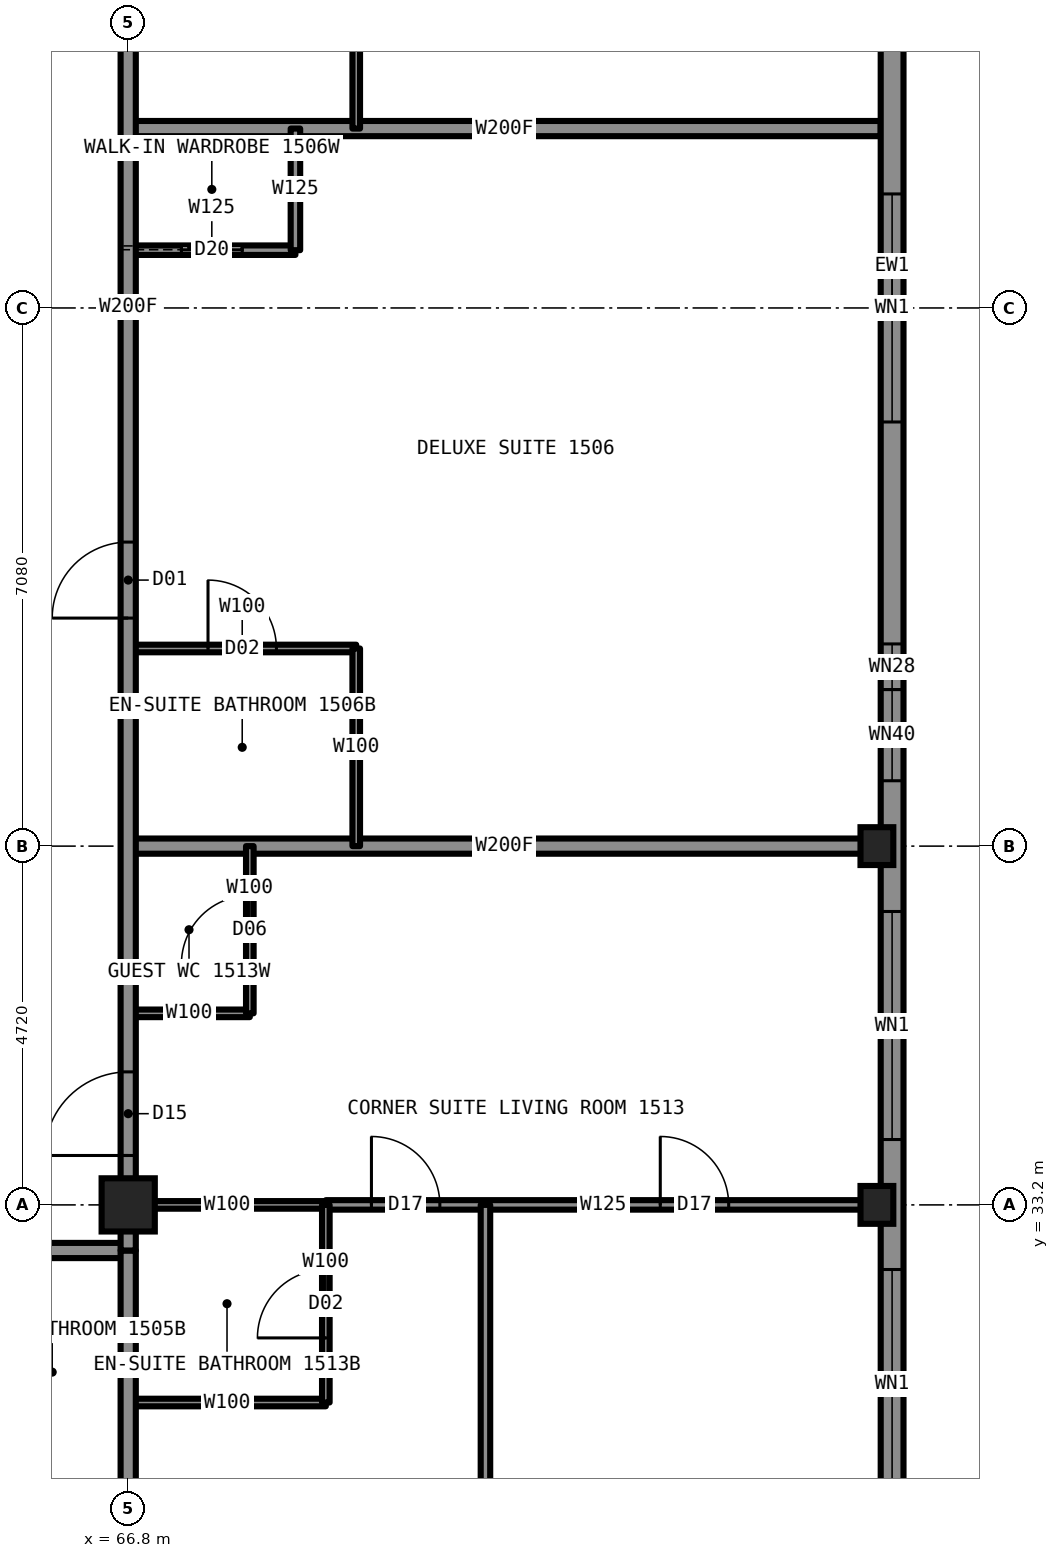
"""IFC4 building model, lengths in metres.
Left out: names, types, materials, properties, quantities, classifications, styles, units other than length and angle.
Written with IfcOpenShell. Run it as: python <this file> out.ifc"""

import sys

from ifc_helpers import new_model, si_unit, direction, frame, frame_2d, origin, origin_2d, place, context, subcontext, project, spatial, rectangle, hollow_rectangle, i_section, extrude, element, fill, save


model = new_model("IFC4")
c1 = context("Model", 3, precision=1e-05, world=origin(), true_north=direction((0.0, 1.0)))
c2 = subcontext(c1, "Body", "Model", "MODEL_VIEW")
j1 = project(units=[si_unit("LENGTHUNIT", "METRE"), si_unit("PLANEANGLEUNIT", "RADIAN")], contexts=[c1])
p1 = place(None, origin())
s1 = spatial("IfcSite", under=j1, at=p1, CompositionType="ELEMENT")
p2 = place(p1, origin())
s2 = spatial("IfcBuilding", under=s1, at=p2, CompositionType="ELEMENT")
p3 = place(p2, frame((0.0, 0.0, 60.0)))
s3 = spatial("IfcBuildingStorey", under=s2, at=p3, CompositionType="ELEMENT", Elevation=60.0)
for number, where, z_axis, x_axis in (
    (1, (76.65, 33.2, 0.0), (0.0, 0.0, 1.0), (1.0, 0.0, 0.0)),
    (2, (76.65, 37.92, 0.0), (0.0, 0.0, 1.0), (1.0, 0.0, 0.0)),
):
    element("IfcColumn", number, at=place(p3, frame(where, z_axis=z_axis, x_axis=x_axis)), inside=s3, PredefinedType="COLUMN", context=c2, shape_type="SweptSolid", body=[
        extrude(i_section(OverallWidth=0.432, OverallDepth=0.498, WebThickness=0.056, FlangeThickness=0.089, at=origin_2d()), origin(), (0.0, 0.0, 1.0), 3.5),
    ])
p4 = place(p3, frame((66.8, 33.2, 0.0), z_axis=(0.0, 0.0, 1.0), x_axis=(1.0, 0.0, 0.0)))
e3 = element("IfcColumn", 3, at=p4, inside=s3, PredefinedType="COLUMN", context=c2, shape_type="SweptSolid", body=[
    extrude(hollow_rectangle(XDim=0.7, YDim=0.7, WallThickness=0.06, at=origin_2d()), origin(), (0.0, 0.0, 1.0), 3.5),
])
p5 = place(p3, frame((66.8, 33.2, 0.0), z_axis=(0.0, 0.0, 1.0), x_axis=(1.0, 0.0, 0.0)))
e4 = element("IfcWall", 4, at=p5, inside=s3, PredefinedType="PARTITIONING", context=c2, shape_type="SweptSolid", body=[
    extrude(rectangle(XDim=2.6, YDim=0.1, at=frame_2d((1.3, 0.0))), origin(), (0.0, 0.0, 1.0), 2.573),
])
p6 = place(p3, frame((69.4, 33.2, 0.0), z_axis=(0.0, 0.0, 1.0), x_axis=(1.0, 0.0, 0.0)))
e5 = element("IfcWall", 5, at=p6, inside=s3, PredefinedType="PARTITIONING", context=c2, shape_type="SweptSolid", body=[
    extrude(rectangle(XDim=7.3, YDim=0.125, at=frame_2d((3.65, 0.0))), origin(), (0.0, 0.0, 1.0), 2.573),
])
p7 = place(p6, frame((0.6, 0.0, 0.0)))
e6 = element("IfcOpeningElement", 6, at=p7, cuts=e5, PredefinedType="OPENING", context=c2, shape_type="SweptSolid", body=[
    extrude(rectangle(XDim=0.9, YDim=2.2, at=frame_2d((0.45, 1.1))), frame((0.0, 0.073, 0.0), z_axis=(0.0, -1.0, 0.0), x_axis=(1.0, 0.0, 0.0)), (0.0, 0.0, 1.0), 0.145),
])
p8 = place(p6, frame((4.4, 0.0, 0.0)))
e7 = element("IfcOpeningElement", 7, at=p8, cuts=e5, PredefinedType="OPENING", context=c2, shape_type="SweptSolid", body=[
    extrude(rectangle(XDim=0.9, YDim=2.2, at=frame_2d((0.45, 1.1))), frame((0.0, 0.073, 0.0), z_axis=(0.0, -1.0, 0.0), x_axis=(1.0, 0.0, 0.0)), (0.0, 0.0, 1.0), 0.145),
])
p9 = place(p3, frame((43.2, 32.6, 0.0), z_axis=(0.0, 0.0, 1.0), x_axis=(1.0, 0.0, 0.0)))
e8 = element("IfcWall", 8, at=p9, inside=s3, PredefinedType="PARTITIONING", context=c2, shape_type="SweptSolid", body=[
    extrude(rectangle(XDim=23.6, YDim=0.2, at=frame_2d((11.8, 0.0))), origin(), (0.0, 0.0, 1.0), 3.33),
])
p10 = place(p9, frame((3.0, 0.0, 0.0)))
e9 = element("IfcOpeningElement", 9, at=p10, cuts=e8, PredefinedType="OPENING", context=c2, shape_type="SweptSolid", body=[
    extrude(rectangle(XDim=1.0, YDim=2.2, at=frame_2d((0.5, 1.1))), frame((0.0, 0.11, 0.0), z_axis=(0.0, -1.0, 0.0), x_axis=(1.0, 0.0, 0.0)), (0.0, 0.0, 1.0), 0.22),
])
p11 = place(p9, frame((12.44, 0.0, 0.0)))
e10 = element("IfcOpeningElement", 10, at=p11, cuts=e8, PredefinedType="OPENING", context=c2, shape_type="SweptSolid", body=[
    extrude(rectangle(XDim=1.0, YDim=2.2, at=frame_2d((0.5, 1.1))), frame((0.0, 0.11, 0.0), z_axis=(0.0, -1.0, 0.0), x_axis=(1.0, 0.0, 0.0)), (0.0, 0.0, 1.0), 0.22),
])
p12 = place(p9, frame((20.34, 0.0, 0.0)))
e11 = element("IfcOpeningElement", 11, at=p12, cuts=e8, PredefinedType="OPENING", context=c2, shape_type="SweptSolid", body=[
    extrude(rectangle(XDim=1.0, YDim=2.2, at=frame_2d((0.5, 1.1))), frame((0.0, 0.11, 0.0), z_axis=(0.0, -1.0, 0.0), x_axis=(1.0, 0.0, 0.0)), (0.0, 0.0, 1.0), 0.22),
])
p13 = place(p3, frame((66.8, 30.6, 0.0), z_axis=(0.0, 0.0, 1.0), x_axis=(1.0, 0.0, 0.0)))
e12 = element("IfcWall", 12, at=p13, inside=s3, PredefinedType="PARTITIONING", context=c2, shape_type="SweptSolid", body=[
    extrude(rectangle(XDim=2.6, YDim=0.1, at=frame_2d((1.3, 0.0))), origin(), (0.0, 0.0, 1.0), 3.33),
])
p14 = place(p3, frame((66.8, 40.52, 0.0), z_axis=(0.0, 0.0, 1.0), x_axis=(1.0, 0.0, 0.0)))
e13 = element("IfcWall", 13, at=p14, inside=s3, PredefinedType="PARTITIONING", context=c2, shape_type="SweptSolid", body=[
    extrude(rectangle(XDim=3.0, YDim=0.1, at=frame_2d((1.5, 0.0))), origin(), (0.0, 0.0, 1.0), 3.33),
])
p15 = place(p14, frame((1.05, 0.0, 0.0)))
e14 = element("IfcOpeningElement", 14, at=p15, cuts=e13, PredefinedType="OPENING", context=c2, shape_type="SweptSolid", body=[
    extrude(rectangle(XDim=0.9, YDim=2.1, at=frame_2d((0.45, 1.05))), frame((0.0, 0.06, 0.0), z_axis=(0.0, -1.0, 0.0), x_axis=(1.0, 0.0, 0.0)), (0.0, 0.0, 1.0), 0.12),
])
p16 = place(p3, frame((66.8, 37.92, 0.0), z_axis=(0.0, 0.0, 1.0), x_axis=(1.0, 0.0, 0.0)))
e15 = element("IfcWall", 15, at=p16, inside=s3, PredefinedType="PARTITIONING", context=c2, shape_type="SweptSolid", body=[
    extrude(rectangle(XDim=9.9, YDim=0.2, at=frame_2d((4.95, 0.0))), origin(), (0.0, 0.0, 1.0), 2.573),
])
p17 = place(p3, frame((66.8, 35.72, 0.0), z_axis=(0.0, 0.0, 1.0), x_axis=(1.0, 0.0, 0.0)))
e16 = element("IfcWall", 16, at=p17, inside=s3, PredefinedType="PARTITIONING", context=c2, shape_type="SweptSolid", body=[
    extrude(rectangle(XDim=1.6, YDim=0.1, at=frame_2d((0.8, 0.0))), origin(), (0.0, 0.0, 1.0), 2.723),
])
p18 = place(p3, frame((66.8, 45.76, 0.0), z_axis=(0.0, 0.0, 1.0), x_axis=(1.0, 0.0, 0.0)))
e17 = element("IfcWall", 17, at=p18, inside=s3, PredefinedType="PARTITIONING", context=c2, shape_type="SweptSolid", body=[
    extrude(rectangle(XDim=2.2, YDim=0.125, at=frame_2d((1.1, 0.0))), origin(), (0.0, 0.0, 1.0), 3.33),
])
p19 = place(p18, frame((0.7, 0.0, 0.0)))
e18 = element("IfcOpeningElement", 18, at=p19, cuts=e17, PredefinedType="OPENING", context=c2, shape_type="SweptSolid", body=[
    extrude(rectangle(XDim=0.8, YDim=2.1, at=frame_2d((0.4, 1.05))), frame((0.0, 0.073, 0.0), z_axis=(0.0, -1.0, 0.0), x_axis=(1.0, 0.0, 0.0)), (0.0, 0.0, 1.0), 0.145),
])
p20 = place(p3, frame((66.8, 47.36, 0.0), z_axis=(0.0, 0.0, 1.0), x_axis=(1.0, 0.0, 0.0)))
e19 = element("IfcWall", 19, at=p20, inside=s3, PredefinedType="PARTITIONING", context=c2, shape_type="SweptSolid", body=[
    extrude(rectangle(XDim=9.9, YDim=0.2, at=frame_2d((4.95, 0.0))), origin(), (0.0, 0.0, 1.0), 2.723),
])
p21 = place(p3, frame((66.8, 33.22, 0.0), z_axis=(0.0, 0.0, 1.0), x_axis=(0.0, 1.0, 0.0)))
e20 = element("IfcWall", 20, at=p21, inside=s3, PredefinedType="PARTITIONING", context=c2, shape_type="SweptSolid", body=[
    extrude(rectangle(XDim=23.58, YDim=0.2, at=frame_2d((11.79, 0.0))), origin(), (0.0, 0.0, 1.0), 3.33),
])
p22 = place(p21, frame((7.7, 0.0, 0.0)))
e21 = element("IfcOpeningElement", 21, at=p22, cuts=e20, PredefinedType="OPENING", context=c2, shape_type="SweptSolid", body=[
    extrude(rectangle(XDim=1.0, YDim=2.2, at=frame_2d((0.5, 1.1))), frame((0.0, 0.11, 0.0), z_axis=(0.0, -1.0, 0.0), x_axis=(1.0, 0.0, 0.0)), (0.0, 0.0, 1.0), 0.22),
])
p23 = place(p21, frame((17.29, 0.0, 0.0)))
e22 = element("IfcOpeningElement", 22, at=p23, cuts=e20, PredefinedType="OPENING", context=c2, shape_type="SweptSolid", body=[
    extrude(rectangle(XDim=1.0, YDim=2.2, at=frame_2d((0.5, 1.1))), frame((0.0, 0.11, 0.0), z_axis=(0.0, -1.0, 0.0), x_axis=(1.0, 0.0, 0.0)), (0.0, 0.0, 1.0), 0.22),
])
p24 = place(p21, frame((21.83, 0.0, 0.0)))
e23 = element("IfcOpeningElement", 23, at=p24, cuts=e20, PredefinedType="OPENING", context=c2, shape_type="SweptSolid", body=[
    extrude(rectangle(XDim=1.1, YDim=2.2, at=frame_2d((0.55, 1.1))), frame((0.0, 0.11, 0.0), z_axis=(0.0, -1.0, 0.0), x_axis=(1.0, 0.0, 0.0)), (0.0, 0.0, 1.0), 0.22),
])
p25 = place(p21, frame((0.63, 0.0, 0.0)))
e24 = element("IfcOpeningElement", 24, at=p25, cuts=e20, PredefinedType="OPENING", context=c2, shape_type="SweptSolid", body=[
    extrude(rectangle(XDim=1.1, YDim=2.2, at=frame_2d((0.55, 1.1))), frame((0.0, 0.11, 0.0), z_axis=(0.0, -1.0, 0.0), x_axis=(1.0, 0.0, 0.0)), (0.0, 0.0, 1.0), 0.22),
])
p26 = place(p3, frame((66.8, 23.3, 0.0), z_axis=(0.0, 0.0, 1.0), x_axis=(0.0, 1.0, 0.0)))
e25 = element("IfcWall", 25, at=p26, inside=s3, PredefinedType="PARTITIONING", context=c2, shape_type="SweptSolid", body=[
    extrude(rectangle(XDim=9.3, YDim=0.2, at=frame_2d((4.65, 0.0))), origin(), (0.0, 0.0, 1.0), 2.573),
])
p27 = place(p3, frame((68.4, 35.72, 0.0), z_axis=(0.0, 0.0, 1.0), x_axis=(0.0, 1.0, 0.0)))
e26 = element("IfcWall", 26, at=p27, inside=s3, PredefinedType="PARTITIONING", context=c2, shape_type="SweptSolid", body=[
    extrude(rectangle(XDim=2.2, YDim=0.1, at=frame_2d((1.1, 0.0))), origin(), (0.0, 0.0, 1.0), 3.33),
])
p28 = place(p27, frame((0.65, 0.0, 0.0)))
e27 = element("IfcOpeningElement", 27, at=p28, cuts=e26, PredefinedType="OPENING", context=c2, shape_type="SweptSolid", body=[
    extrude(rectangle(XDim=0.9, YDim=2.1, at=frame_2d((0.45, 1.05))), frame((0.0, 0.06, 0.0), z_axis=(0.0, -1.0, 0.0), x_axis=(1.0, 0.0, 0.0)), (0.0, 0.0, 1.0), 0.12),
])
p29 = place(p3, frame((69.0, 45.76, 0.0), z_axis=(0.0, 0.0, 1.0), x_axis=(0.0, 1.0, 0.0)))
e28 = element("IfcWall", 28, at=p29, inside=s3, PredefinedType="PARTITIONING", context=c2, shape_type="SweptSolid", body=[
    extrude(rectangle(XDim=1.6, YDim=0.125, at=frame_2d((0.8, 0.0))), origin(), (0.0, 0.0, 1.0), 3.33),
])
p30 = place(p3, frame((69.4, 30.6, 0.0), z_axis=(0.0, 0.0, 1.0), x_axis=(0.0, 1.0, 0.0)))
e29 = element("IfcWall", 29, at=p30, inside=s3, PredefinedType="PARTITIONING", context=c2, shape_type="SweptSolid", body=[
    extrude(rectangle(XDim=2.6, YDim=0.1, at=frame_2d((1.3, 0.0))), origin(), (0.0, 0.0, 1.0), 3.33),
])
p31 = place(p30, frame((0.85, 0.0, 0.0)))
e30 = element("IfcOpeningElement", 30, at=p31, cuts=e29, PredefinedType="OPENING", context=c2, shape_type="SweptSolid", body=[
    extrude(rectangle(XDim=0.9, YDim=2.1, at=frame_2d((0.45, 1.05))), frame((0.0, 0.06, 0.0), z_axis=(0.0, -1.0, 0.0), x_axis=(1.0, 0.0, 0.0)), (0.0, 0.0, 1.0), 0.12),
])
p32 = place(p3, frame((69.8, 37.92, 0.0), z_axis=(0.0, 0.0, 1.0), x_axis=(0.0, 1.0, 0.0)))
e31 = element("IfcWall", 31, at=p32, inside=s3, PredefinedType="PARTITIONING", context=c2, shape_type="SweptSolid", body=[
    extrude(rectangle(XDim=2.6, YDim=0.1, at=frame_2d((1.3, 0.0))), origin(), (0.0, 0.0, 1.0), 3.33),
])
p33 = place(p3, frame((69.8, 47.36, 0.0), z_axis=(0.0, 0.0, 1.0), x_axis=(0.0, 1.0, 0.0)))
e32 = element("IfcWall", 32, at=p33, inside=s3, PredefinedType="PARTITIONING", context=c2, shape_type="SweptSolid", body=[
    extrude(rectangle(XDim=2.9, YDim=0.1, at=frame_2d((1.45, 0.0))), origin(), (0.0, 0.0, 1.0), 3.33),
])
p34 = place(p3, frame((71.5, 23.306, 0.0), z_axis=(0.0, 0.0, 1.0), x_axis=(0.0, 1.0, 0.0)))
e33 = element("IfcWall", 33, at=p34, inside=s3, PredefinedType="PARTITIONING", context=c2, shape_type="SweptSolid", body=[
    extrude(rectangle(XDim=9.894, YDim=0.125, at=frame_2d((4.947, 0.0))), origin(), (0.0, 0.0, 1.0), 3.33),
])
p35 = place(p3, frame((76.85, 28.5, 0.0), z_axis=(0.0, 0.0, 1.0), x_axis=(0.0, 1.0, 0.0)))
e34 = element("IfcWall", 34, at=p35, inside=s3, PredefinedType="SOLIDWALL", context=c2, shape_type="SweptSolid", body=[
    extrude(rectangle(XDim=33.0, YDim=0.3, at=frame_2d((16.5, 0.0))), origin(), (0.0, 0.0, 1.0), 2.83),
])
p36 = place(p35, frame((0.85, 0.0, 0.5)))
e35 = element("IfcOpeningElement", 35, at=p36, cuts=e34, PredefinedType="OPENING", context=c2, shape_type="SweptSolid", body=[
    extrude(rectangle(XDim=3.0, YDim=2.0, at=frame_2d((1.5, 1.0))), frame((0.0, 0.16, 0.0), z_axis=(0.0, -1.0, 0.0), x_axis=(1.0, 0.0, 0.0)), (0.0, 0.0, 1.0), 0.32),
])
p37 = place(p35, frame((5.56, 0.0, 0.5)))
e36 = element("IfcOpeningElement", 36, at=p37, cuts=e34, PredefinedType="OPENING", context=c2, shape_type="SweptSolid", body=[
    extrude(rectangle(XDim=3.0, YDim=2.0, at=frame_2d((1.5, 1.0))), frame((0.0, 0.16, 0.0), z_axis=(0.0, -1.0, 0.0), x_axis=(1.0, 0.0, 0.0)), (0.0, 0.0, 1.0), 0.32),
])
p38 = place(p35, frame((10.28, 0.0, 0.5)))
e37 = element("IfcOpeningElement", 37, at=p38, cuts=e34, PredefinedType="OPENING", context=c2, shape_type="SweptSolid", body=[
    extrude(rectangle(XDim=1.2, YDim=1.7, at=frame_2d((0.6, 0.85))), frame((0.0, 0.16, 0.0), z_axis=(0.0, -1.0, 0.0), x_axis=(1.0, 0.0, 0.0)), (0.0, 0.0, 1.0), 0.32),
])
p39 = place(p35, frame((15.0, 0.0, 0.5)))
e38 = element("IfcOpeningElement", 38, at=p39, cuts=e34, PredefinedType="OPENING", context=c2, shape_type="SweptSolid", body=[
    extrude(rectangle(XDim=3.0, YDim=2.0, at=frame_2d((1.5, 1.0))), frame((0.0, 0.16, 0.0), z_axis=(0.0, -1.0, 0.0), x_axis=(1.0, 0.0, 0.0)), (0.0, 0.0, 1.0), 0.32),
])
p40 = place(p35, frame((21.52, 0.0, 0.5)))
e39 = element("IfcOpeningElement", 39, at=p40, cuts=e34, PredefinedType="OPENING", context=c2, shape_type="SweptSolid", body=[
    extrude(rectangle(XDim=1.2, YDim=1.7, at=frame_2d((0.6, 0.85))), frame((0.0, 0.16, 0.0), z_axis=(0.0, -1.0, 0.0), x_axis=(1.0, 0.0, 0.0)), (0.0, 0.0, 1.0), 0.32),
])
p41 = place(p35, frame((24.44, 0.0, 0.5)))
e40 = element("IfcOpeningElement", 40, at=p41, cuts=e34, PredefinedType="OPENING", context=c2, shape_type="SweptSolid", body=[
    extrude(rectangle(XDim=3.0, YDim=2.0, at=frame_2d((1.5, 1.0))), frame((0.0, 0.16, 0.0), z_axis=(0.0, -1.0, 0.0), x_axis=(1.0, 0.0, 0.0)), (0.0, 0.0, 1.0), 0.32),
])
p42 = place(p35, frame((29.15, 0.0, 0.5)))
e41 = element("IfcOpeningElement", 41, at=p42, cuts=e34, PredefinedType="OPENING", context=c2, shape_type="SweptSolid", body=[
    extrude(rectangle(XDim=3.0, YDim=2.0, at=frame_2d((1.5, 1.0))), frame((0.0, 0.16, 0.0), z_axis=(0.0, -1.0, 0.0), x_axis=(1.0, 0.0, 0.0)), (0.0, 0.0, 1.0), 0.32),
])
p43 = place(p35, frame((11.48, 0.0, 0.5)))
e42 = element("IfcOpeningElement", 42, at=p43, cuts=e34, PredefinedType="OPENING", context=c2, shape_type="SweptSolid", body=[
    extrude(rectangle(XDim=0.6, YDim=0.8, at=frame_2d((0.3, 0.4))), frame((0.0, 0.16, 0.0), z_axis=(0.0, -1.0, 0.0), x_axis=(1.0, 0.0, 0.0)), (0.0, 0.0, 1.0), 0.32),
])
p44 = place(p35, frame((20.87, 0.0, 0.5)))
e43 = element("IfcOpeningElement", 43, at=p44, cuts=e34, PredefinedType="OPENING", context=c2, shape_type="SweptSolid", body=[
    extrude(rectangle(XDim=0.6, YDim=0.8, at=frame_2d((0.3, 0.4))), frame((0.0, 0.16, 0.0), z_axis=(0.0, -1.0, 0.0), x_axis=(1.0, 0.0, 0.0)), (0.0, 0.0, 1.0), 0.32),
])
p45 = place(p3, frame((66.8, 32.6, 0.0), z_axis=(0.0, 0.0, 1.0), x_axis=(0.0, 1.0, 0.0)))
e44 = element("IfcWall", 44, at=p45, inside=s3, PredefinedType="PARTITIONING", context=c2, shape_type="SweptSolid", body=[
    extrude(rectangle(XDim=0.62, YDim=0.2, at=frame_2d((0.31, 0.0))), origin(), (0.0, 0.0, 1.0), 2.573),
])
p46 = place(p22, origin())
e45 = element("IfcDoor", 45, at=p46, inside=s3, OperationType="SINGLE_SWING_LEFT", PredefinedType="DOOR", context=c2, shape_type="SweptSolid", body=[
    extrude(rectangle(XDim=1.0, YDim=2.2, at=frame_2d((0.5, 1.1))), frame((0.0, 0.025, 0.0), z_axis=(0.0, -1.0, 0.0), x_axis=(1.0, 0.0, 0.0)), (0.0, 0.0, 1.0), 0.05),
])
fill(e21, e45)
p47 = place(p15, origin())
e46 = element("IfcDoor", 46, at=p47, inside=s3, OperationType="SINGLE_SWING_RIGHT", PredefinedType="DOOR", context=c2, shape_type="SweptSolid", body=[
    extrude(rectangle(XDim=0.9, YDim=2.1, at=frame_2d((0.45, 1.05))), frame((0.0, 0.025, 0.0), z_axis=(0.0, -1.0, 0.0), x_axis=(1.0, 0.0, 0.0)), (0.0, 0.0, 1.0), 0.05),
])
fill(e14, e46)
p48 = place(p19, origin())
e47 = element("IfcDoor", 47, at=p48, inside=s3, OperationType="SLIDING_TO_LEFT", PredefinedType="DOOR", context=c2, shape_type="SweptSolid", body=[
    extrude(rectangle(XDim=0.8, YDim=2.1, at=frame_2d((0.4, 1.05))), frame((0.0, 0.025, 0.0), z_axis=(0.0, -1.0, 0.0), x_axis=(1.0, 0.0, 0.0)), (0.0, 0.0, 1.0), 0.05),
])
fill(e18, e47)
p49 = place(p25, origin())
e48 = element("IfcDoor", 48, at=p49, inside=s3, OperationType="SINGLE_SWING_LEFT", PredefinedType="DOOR", context=c2, shape_type="SweptSolid", body=[
    extrude(rectangle(XDim=1.1, YDim=2.2, at=frame_2d((0.55, 1.1))), frame((0.0, 0.025, 0.0), z_axis=(0.0, -1.0, 0.0), x_axis=(1.0, 0.0, 0.0)), (0.0, 0.0, 1.0), 0.05),
])
fill(e24, e48)
p50 = place(p31, origin())
e49 = element("IfcDoor", 49, at=p50, inside=s3, OperationType="SINGLE_SWING_RIGHT", PredefinedType="DOOR", context=c2, shape_type="SweptSolid", body=[
    extrude(rectangle(XDim=0.9, YDim=2.1, at=frame_2d((0.45, 1.05))), frame((0.0, 0.025, 0.0), z_axis=(0.0, -1.0, 0.0), x_axis=(1.0, 0.0, 0.0)), (0.0, 0.0, 1.0), 0.05),
])
fill(e30, e49)
p51 = place(p7, origin())
e50 = element("IfcDoor", 50, at=p51, inside=s3, OperationType="SINGLE_SWING_LEFT", PredefinedType="DOOR", context=c2, shape_type="SweptSolid", body=[
    extrude(rectangle(XDim=0.9, YDim=2.2, at=frame_2d((0.45, 1.1))), frame((0.0, 0.025, 0.0), z_axis=(0.0, -1.0, 0.0), x_axis=(1.0, 0.0, 0.0)), (0.0, 0.0, 1.0), 0.05),
])
fill(e6, e50)
p52 = place(p8, origin())
e51 = element("IfcDoor", 51, at=p52, inside=s3, OperationType="SINGLE_SWING_LEFT", PredefinedType="DOOR", context=c2, shape_type="SweptSolid", body=[
    extrude(rectangle(XDim=0.9, YDim=2.2, at=frame_2d((0.45, 1.1))), frame((0.0, 0.025, 0.0), z_axis=(0.0, -1.0, 0.0), x_axis=(1.0, 0.0, 0.0)), (0.0, 0.0, 1.0), 0.05),
])
fill(e7, e51)
p53 = place(p28, origin())
e52 = element("IfcDoor", 52, at=p53, inside=s3, OperationType="SINGLE_SWING_LEFT", PredefinedType="DOOR", context=c2, shape_type="SweptSolid", body=[
    extrude(rectangle(XDim=0.9, YDim=2.1, at=frame_2d((0.45, 1.05))), frame((0.0, 0.025, 0.0), z_axis=(0.0, -1.0, 0.0), x_axis=(1.0, 0.0, 0.0)), (0.0, 0.0, 1.0), 0.05),
])
fill(e27, e52)
p54 = place(p36, origin())
e53 = element("IfcWindow", 53, at=p54, inside=s3, PartitioningType="SINGLE_PANEL", PredefinedType="WINDOW", context=c2, shape_type="SweptSolid", body=[
    extrude(rectangle(XDim=3.0, YDim=2.0, at=frame_2d((1.5, 1.0))), frame((0.0, 0.03, 0.0), z_axis=(0.0, -1.0, 0.0), x_axis=(1.0, 0.0, 0.0)), (0.0, 0.0, 1.0), 0.06),
])
fill(e35, e53)
p55 = place(p37, origin())
e54 = element("IfcWindow", 54, at=p55, inside=s3, PartitioningType="SINGLE_PANEL", PredefinedType="WINDOW", context=c2, shape_type="SweptSolid", body=[
    extrude(rectangle(XDim=3.0, YDim=2.0, at=frame_2d((1.5, 1.0))), frame((0.0, 0.03, 0.0), z_axis=(0.0, -1.0, 0.0), x_axis=(1.0, 0.0, 0.0)), (0.0, 0.0, 1.0), 0.06),
])
fill(e36, e54)
p56 = place(p38, origin())
e55 = element("IfcWindow", 55, at=p56, inside=s3, PartitioningType="SINGLE_PANEL", PredefinedType="WINDOW", context=c2, shape_type="SweptSolid", body=[
    extrude(rectangle(XDim=1.2, YDim=1.7, at=frame_2d((0.6, 0.85))), frame((0.0, 0.03, 0.0), z_axis=(0.0, -1.0, 0.0), x_axis=(1.0, 0.0, 0.0)), (0.0, 0.0, 1.0), 0.06),
])
fill(e37, e55)
p57 = place(p39, origin())
e56 = element("IfcWindow", 56, at=p57, inside=s3, PartitioningType="SINGLE_PANEL", PredefinedType="WINDOW", context=c2, shape_type="SweptSolid", body=[
    extrude(rectangle(XDim=3.0, YDim=2.0, at=frame_2d((1.5, 1.0))), frame((0.0, 0.03, 0.0), z_axis=(0.0, -1.0, 0.0), x_axis=(1.0, 0.0, 0.0)), (0.0, 0.0, 1.0), 0.06),
])
fill(e38, e56)
p58 = place(p43, origin())
e57 = element("IfcWindow", 57, at=p58, inside=s3, PartitioningType="SINGLE_PANEL", PredefinedType="WINDOW", context=c2, shape_type="SweptSolid", body=[
    extrude(rectangle(XDim=0.6, YDim=0.8, at=frame_2d((0.3, 0.4))), frame((0.0, 0.03, 0.0), z_axis=(0.0, -1.0, 0.0), x_axis=(1.0, 0.0, 0.0)), (0.0, 0.0, 1.0), 0.06),
])
fill(e42, e57)
save(model, sys.argv[1])
